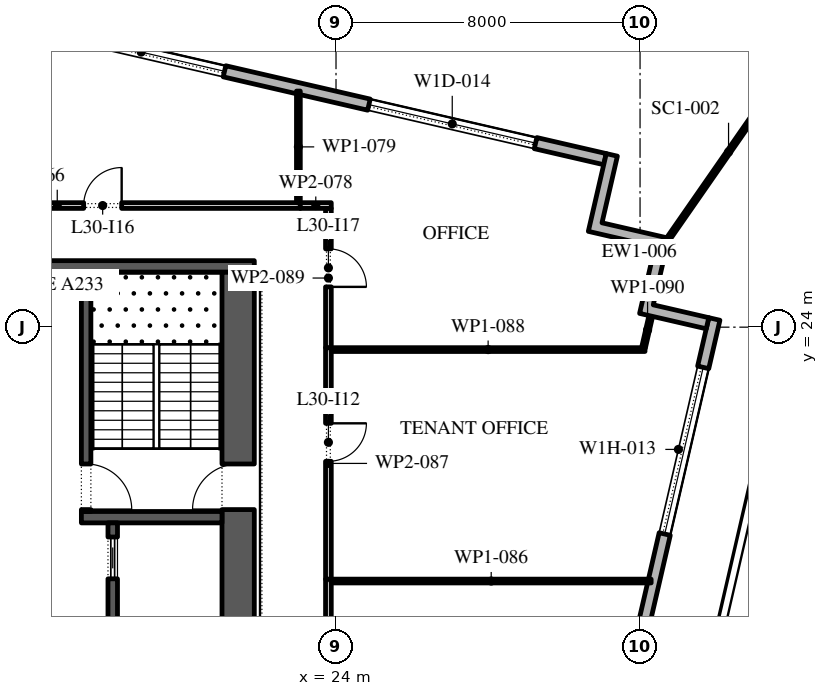
"""IFC4 building model, lengths in metres.
Left out: names, types, materials, properties, quantities, classifications, styles, units other than length and angle.
Written with IfcOpenShell. Run it as: python <this file> out.ifc"""

import sys

from ifc_helpers import new_model, si_unit, direction, frame, frame_2d, origin, place, context, subcontext, project, spatial, polyline, rectangle, outline, extrude, element, fill, save


model = new_model("IFC4")
c1 = context("Model", 3, precision=1e-05, world=origin(), true_north=direction((0.0, 1.0)))
c2 = subcontext(c1, "Body", "Model", "MODEL_VIEW")
j1 = project(units=[si_unit("LENGTHUNIT", "METRE"), si_unit("PLANEANGLEUNIT", "RADIAN")], contexts=[c1])
p1 = place(None, origin())
s1 = spatial("IfcSite", under=j1, at=p1, CompositionType="ELEMENT")
p2 = place(p1, origin())
s2 = spatial("IfcBuilding", under=s1, at=p2, CompositionType="ELEMENT")
p3 = place(p2, frame((0.0, 0.0, 139.2)))
s3 = spatial("IfcBuildingStorey", under=s2, at=p3, CompositionType="ELEMENT", Elevation=139.2)
p4 = place(p3, frame((22.82, -24.016, 0.0), z_axis=(0.0, 0.0, 1.0), x_axis=(0.224953880882, 0.974369412223, 0.0)))
e1 = element("IfcWall", 1, at=p4, inside=s3, PredefinedType="STANDARD", context=c2, shape_type="SweptSolid", body=[
    extrude(rectangle(XDim=49.5, YDim=0.3, at=frame_2d((24.75, 0.0))), origin(), (0.0, 0.0, 1.0), 4.0),
])
p5 = place(p4, frame((1.157, 0.0, 0.45)))
e2 = element("IfcOpeningElement", 2, at=p5, cuts=e1, PredefinedType="OPENING", context=c2, shape_type="SweptSolid", body=[
    extrude(rectangle(XDim=4.5, YDim=3.05, at=frame_2d((2.25, 1.525))), frame((0.0, 0.16, 0.0), z_axis=(0.0, -1.0, 0.0), x_axis=(1.0, 0.0, 0.0)), (0.0, 0.0, 1.0), 0.32),
])
p6 = place(p4, frame((8.121, 0.0, 0.45)))
e3 = element("IfcOpeningElement", 3, at=p6, cuts=e1, PredefinedType="OPENING", context=c2, shape_type="SweptSolid", body=[
    extrude(rectangle(XDim=4.5, YDim=3.05, at=frame_2d((2.25, 1.525))), frame((0.0, 0.16, 0.0), z_axis=(0.0, -1.0, 0.0), x_axis=(1.0, 0.0, 0.0)), (0.0, 0.0, 1.0), 0.32),
])
p7 = place(p4, frame((15.236, 0.0, 0.45)))
e4 = element("IfcOpeningElement", 4, at=p7, cuts=e1, PredefinedType="OPENING", context=c2, shape_type="SweptSolid", body=[
    extrude(rectangle(XDim=4.5, YDim=3.05, at=frame_2d((2.25, 1.525))), frame((0.0, 0.16, 0.0), z_axis=(0.0, -1.0, 0.0), x_axis=(1.0, 0.0, 0.0)), (0.0, 0.0, 1.0), 0.32),
])
p8 = place(p4, frame((23.4, 0.0, 0.0)))
e5 = element("IfcOpeningElement", 5, at=p8, cuts=e1, PredefinedType="OPENING", context=c2, shape_type="SweptSolid", body=[
    extrude(rectangle(XDim=2.4, YDim=3.5, at=frame_2d((1.2, 1.75))), frame((0.0, 0.16, 0.0), z_axis=(0.0, -1.0, 0.0), x_axis=(1.0, 0.0, 0.0)), (0.0, 0.0, 1.0), 0.32),
])
p9 = place(p4, frame((29.464, 0.0, 0.45)))
e6 = element("IfcOpeningElement", 6, at=p9, cuts=e1, PredefinedType="OPENING", context=c2, shape_type="SweptSolid", body=[
    extrude(rectangle(XDim=4.5, YDim=2.875, at=frame_2d((2.25, 1.438))), frame((0.0, 0.16, 0.0), z_axis=(0.0, -1.0, 0.0), x_axis=(1.0, 0.0, 0.0)), (0.0, 0.0, 1.0), 0.32),
])
p10 = place(p4, frame((36.579, 0.0, 0.45)))
e7 = element("IfcOpeningElement", 7, at=p10, cuts=e1, PredefinedType="OPENING", context=c2, shape_type="SweptSolid", body=[
    extrude(rectangle(XDim=4.5, YDim=2.825, at=frame_2d((2.25, 1.413))), frame((0.0, 0.16, 0.0), z_axis=(0.0, -1.0, 0.0), x_axis=(1.0, 0.0, 0.0)), (0.0, 0.0, 1.0), 0.32),
])
p11 = place(p4, frame((43.693, 0.0, 0.45)))
e8 = element("IfcOpeningElement", 8, at=p11, cuts=e1, PredefinedType="OPENING", context=c2, shape_type="SweptSolid", body=[
    extrude(rectangle(XDim=4.5, YDim=2.75, at=frame_2d((2.25, 1.375))), frame((0.0, 0.16, 0.0), z_axis=(0.0, -1.0, 0.0), x_axis=(1.0, 0.0, 0.0)), (0.0, 0.0, 1.0), 0.32),
])
p12 = place(p3, frame((31.078, 28.421, 0.0), z_axis=(0.0, 0.0, 1.0), x_axis=(-0.974370456532, 0.224949357493, 0.0)))
e9 = element("IfcWall", 9, at=p12, inside=s3, PredefinedType="STANDARD", context=c2, shape_type="SweptSolid", body=[
    extrude(rectangle(XDim=51.0, YDim=0.3, at=frame_2d((25.5, 0.0))), origin(), (0.0, 0.0, 1.0), 4.0),
])
p13 = place(p12, frame((1.875, 0.0, 0.45)))
e10 = element("IfcOpeningElement", 10, at=p13, cuts=e9, PredefinedType="OPENING", context=c2, shape_type="SweptSolid", body=[
    extrude(rectangle(XDim=4.5, YDim=2.875, at=frame_2d((2.25, 1.438))), frame((0.0, 0.16, 0.0), z_axis=(0.0, -1.0, 0.0), x_axis=(1.0, 0.0, 0.0)), (0.0, 0.0, 1.0), 0.32),
])
p14 = place(p12, frame((10.275, 0.0, 0.45)))
e11 = element("IfcOpeningElement", 11, at=p14, cuts=e9, PredefinedType="OPENING", context=c2, shape_type="SweptSolid", body=[
    extrude(rectangle(XDim=4.5, YDim=2.825, at=frame_2d((2.25, 1.413))), frame((0.0, 0.16, 0.0), z_axis=(0.0, -1.0, 0.0), x_axis=(1.0, 0.0, 0.0)), (0.0, 0.0, 1.0), 0.32),
])
p15 = place(p12, frame((18.825, 0.0, 0.45)))
e12 = element("IfcOpeningElement", 12, at=p15, cuts=e9, PredefinedType="OPENING", context=c2, shape_type="SweptSolid", body=[
    extrude(rectangle(XDim=4.5, YDim=2.75, at=frame_2d((2.25, 1.375))), frame((0.0, 0.16, 0.0), z_axis=(0.0, -1.0, 0.0), x_axis=(1.0, 0.0, 0.0)), (0.0, 0.0, 1.0), 0.32),
])
p16 = place(p12, frame((27.075, 0.0, 0.0)))
e13 = element("IfcOpeningElement", 13, at=p16, cuts=e9, PredefinedType="OPENING", context=c2, shape_type="SweptSolid", body=[
    extrude(rectangle(XDim=2.4, YDim=3.125, at=frame_2d((1.2, 1.562))), frame((0.0, 0.16, 0.0), z_axis=(0.0, -1.0, 0.0), x_axis=(1.0, 0.0, 0.0)), (0.0, 0.0, 1.0), 0.32),
])
p17 = place(p12, frame((35.925, 0.0, 0.45)))
e14 = element("IfcOpeningElement", 14, at=p17, cuts=e9, PredefinedType="OPENING", context=c2, shape_type="SweptSolid", body=[
    extrude(rectangle(XDim=4.5, YDim=2.525, at=frame_2d((2.25, 1.262))), frame((0.0, 0.16, 0.0), z_axis=(0.0, -1.0, 0.0), x_axis=(1.0, 0.0, 0.0)), (0.0, 0.0, 1.0), 0.32),
])
p18 = place(p12, frame((44.475, 0.0, 0.45)))
e15 = element("IfcOpeningElement", 15, at=p18, cuts=e9, PredefinedType="OPENING", context=c2, shape_type="SweptSolid", body=[
    extrude(rectangle(XDim=4.5, YDim=2.45, at=frame_2d((2.25, 1.225))), frame((0.0, 0.16, 0.0), z_axis=(0.0, -1.0, 0.0), x_axis=(1.0, 0.0, 0.0)), (0.0, 0.0, 1.0), 0.32),
])
p19 = place(p3, origin())
e16 = element("IfcWall", 16, at=p19, inside=s3, PredefinedType="STANDARD", context=c2, shape_type="SweptSolid", body=[
    extrude(outline(polyline([(32.393, 26.116), (30.639, 26.521), (31.111, 28.567), (31.404, 28.5), (30.999, 26.746), (32.753, 26.341), (32.348, 24.587), (33.809, 24.25), (33.742, 23.957), (31.988, 24.362), (32.393, 26.116)])), origin(), (0.0, 0.0, 1.0), 4.0),
])
p20 = place(p3, frame((32.753, 26.341, -0.05), z_axis=(0.0, 0.0, 1.0), x_axis=(0.570723811276, 0.821142089557, 0.0)))
e17 = element("IfcWall", 17, at=p20, inside=s3, PredefinedType="STANDARD", context=c2, shape_type="SweptSolid", body=[
    extrude(rectangle(XDim=5.523, YDim=0.1, at=frame_2d((2.761, 0.0))), origin(), (0.0, 0.0, 1.0), 4.05),
])
p21 = place(p3, frame((21.425, -2.45, 0.0), z_axis=(0.0, 0.0, 1.0), x_axis=(0.0, 1.0, 0.0)))
e18 = element("IfcWall", 18, at=p21, inside=s3, PredefinedType="SHEAR", context=c2, shape_type="SweptSolid", body=[
    extrude(rectangle(XDim=27.9, YDim=0.85, at=frame_2d((13.95, 0.0))), origin(), (0.0, 0.0, 1.0), 4.0),
])
p22 = place(p21, frame((5.05, 0.0, 0.0)))
e19 = element("IfcOpeningElement", 19, at=p22, cuts=e18, PredefinedType="OPENING", context=c2, shape_type="SweptSolid", body=[
    extrude(rectangle(XDim=1.2, YDim=2.1, at=frame_2d((0.6, 1.05))), frame((0.0, 0.435, 0.0), z_axis=(0.0, -1.0, 0.0), x_axis=(1.0, 0.0, 0.0)), (0.0, 0.0, 1.0), 0.87),
])
p23 = place(p21, frame((21.65, 0.0, 0.0)))
e20 = element("IfcOpeningElement", 20, at=p23, cuts=e18, PredefinedType="OPENING", context=c2, shape_type="SweptSolid", body=[
    extrude(rectangle(XDim=1.2, YDim=2.1, at=frame_2d((0.6, 1.05))), frame((0.0, 0.435, 0.0), z_axis=(0.0, -1.0, 0.0), x_axis=(1.0, 0.0, 0.0)), (0.0, 0.0, 1.0), 0.87),
])
p24 = place(p3, frame((10.15, 25.6, 0.0), z_axis=(0.0, 0.0, 1.0), x_axis=(1.0, 0.0, 0.0)))
e21 = element("IfcWall", 21, at=p24, inside=s3, PredefinedType="SHEAR", context=c2, shape_type="SweptSolid", body=[
    extrude(rectangle(XDim=11.7, YDim=0.3, at=frame_2d((5.85, 0.0))), origin(), (0.0, 0.0, 1.0), 4.0),
])
p25 = place(p3, frame((17.3, 19.0, 0.0), z_axis=(0.0, 0.0, 1.0), x_axis=(1.0, 0.0, 0.0)))
e22 = element("IfcWall", 22, at=p25, inside=s3, PredefinedType="SHEAR", context=c2, shape_type="SweptSolid", body=[
    extrude(rectangle(XDim=3.7, YDim=0.3, at=frame_2d((1.85, 0.0))), origin(), (0.0, 0.0, 1.0), 4.0),
])
p26 = place(p3, frame((17.425, 19.15, 0.0), z_axis=(0.0, 0.0, 1.0), x_axis=(0.0, 1.0, 0.0)))
e23 = element("IfcWall", 23, at=p26, inside=s3, PredefinedType="SHEAR", context=c2, shape_type="SweptSolid", body=[
    extrude(rectangle(XDim=6.3, YDim=0.25, at=frame_2d((3.15, 0.0))), origin(), (0.0, 0.0, 1.0), 4.0),
])
p27 = place(p26, frame((0.05, 0.0, 0.0)))
e24 = element("IfcOpeningElement", 24, at=p27, cuts=e23, PredefinedType="OPENING", context=c2, shape_type="SweptSolid", body=[
    extrude(rectangle(XDim=1.2, YDim=2.1, at=frame_2d((0.6, 1.05))), frame((0.0, 0.135, 0.0), z_axis=(0.0, -1.0, 0.0), x_axis=(1.0, 0.0, 0.0)), (0.0, 0.0, 1.0), 0.27),
])
p28 = place(p3, frame((18.125, 4.15, 0.0), z_axis=(0.0, 0.0, 1.0), x_axis=(0.0, 1.0, 0.0)))
e25 = element("IfcWall", 25, at=p28, inside=s3, PredefinedType="SHEAR", context=c2, shape_type="SweptSolid", body=[
    extrude(rectangle(XDim=14.7, YDim=0.25, at=frame_2d((7.35, 0.0))), origin(), (0.0, 0.0, 1.0), 4.0),
])
p29 = place(p28, frame((0.371, 0.0, 0.0)))
e26 = element("IfcOpeningElement", 26, at=p29, cuts=e25, PredefinedType="OPENING", context=c2, shape_type="SweptSolid", body=[
    extrude(rectangle(XDim=1.1, YDim=2.1, at=frame_2d((0.55, 1.05))), frame((0.0, 0.135, 0.0), z_axis=(0.0, -1.0, 0.0), x_axis=(1.0, 0.0, 0.0)), (0.0, 0.0, 1.0), 0.27),
])
p30 = place(p28, frame((2.514, 0.0, 0.0)))
e27 = element("IfcOpeningElement", 27, at=p30, cuts=e25, PredefinedType="OPENING", context=c2, shape_type="SweptSolid", body=[
    extrude(rectangle(XDim=1.1, YDim=2.1, at=frame_2d((0.55, 1.05))), frame((0.0, 0.135, 0.0), z_axis=(0.0, -1.0, 0.0), x_axis=(1.0, 0.0, 0.0)), (0.0, 0.0, 1.0), 0.27),
])
p31 = place(p28, frame((4.657, 0.0, 0.0)))
e28 = element("IfcOpeningElement", 28, at=p31, cuts=e25, PredefinedType="OPENING", context=c2, shape_type="SweptSolid", body=[
    extrude(rectangle(XDim=1.1, YDim=2.1, at=frame_2d((0.55, 1.05))), frame((0.0, 0.135, 0.0), z_axis=(0.0, -1.0, 0.0), x_axis=(1.0, 0.0, 0.0)), (0.0, 0.0, 1.0), 0.27),
])
p32 = place(p28, frame((6.8, 0.0, 0.0)))
e29 = element("IfcOpeningElement", 29, at=p32, cuts=e25, PredefinedType="OPENING", context=c2, shape_type="SweptSolid", body=[
    extrude(rectangle(XDim=1.1, YDim=2.1, at=frame_2d((0.55, 1.05))), frame((0.0, 0.135, 0.0), z_axis=(0.0, -1.0, 0.0), x_axis=(1.0, 0.0, 0.0)), (0.0, 0.0, 1.0), 0.27),
])
p33 = place(p28, frame((8.943, 0.0, 0.0)))
e30 = element("IfcOpeningElement", 30, at=p33, cuts=e25, PredefinedType="OPENING", context=c2, shape_type="SweptSolid", body=[
    extrude(rectangle(XDim=1.1, YDim=2.1, at=frame_2d((0.55, 1.05))), frame((0.0, 0.135, 0.0), z_axis=(0.0, -1.0, 0.0), x_axis=(1.0, 0.0, 0.0)), (0.0, 0.0, 1.0), 0.27),
])
p34 = place(p28, frame((11.086, 0.0, 0.0)))
e31 = element("IfcOpeningElement", 31, at=p34, cuts=e25, PredefinedType="OPENING", context=c2, shape_type="SweptSolid", body=[
    extrude(rectangle(XDim=1.1, YDim=2.1, at=frame_2d((0.55, 1.05))), frame((0.0, 0.135, 0.0), z_axis=(0.0, -1.0, 0.0), x_axis=(1.0, 0.0, 0.0)), (0.0, 0.0, 1.0), 0.27),
])
p35 = place(p28, frame((13.229, 0.0, 0.0)))
e32 = element("IfcOpeningElement", 32, at=p35, cuts=e25, PredefinedType="OPENING", context=c2, shape_type="SweptSolid", body=[
    extrude(rectangle(XDim=1.1, YDim=2.1, at=frame_2d((0.55, 1.05))), frame((0.0, 0.135, 0.0), z_axis=(0.0, -1.0, 0.0), x_axis=(1.0, 0.0, 0.0)), (0.0, 0.0, 1.0), 0.27),
])
p36 = place(p3, frame((10.27, 27.2, 0.0), z_axis=(0.0, 0.0, 1.0), x_axis=(1.0, 0.0, 0.0)))
e33 = element("IfcWall", 33, at=p36, inside=s3, PredefinedType="PARTITIONING", context=c2, shape_type="SweptSolid", body=[
    extrude(rectangle(XDim=12.79, YDim=0.15, at=frame_2d((6.395, 0.0))), origin(), (0.0, 0.0, 1.0), 4.0),
])
p37 = place(p36, frame((7.09, 0.0, 0.0)))
e34 = element("IfcOpeningElement", 34, at=p37, cuts=e33, PredefinedType="OPENING", context=c2, shape_type="SweptSolid", body=[
    extrude(rectangle(XDim=1.0, YDim=2.1, at=frame_2d((0.5, 1.05))), frame((0.0, 0.085, 0.0), z_axis=(0.0, -1.0, 0.0), x_axis=(1.0, 0.0, 0.0)), (0.0, 0.0, 1.0), 0.17),
])
p38 = place(p3, frame((23.06, 27.2, 0.0), z_axis=(0.0, 0.0, 1.0), x_axis=(1.0, 0.0, 0.0)))
e35 = element("IfcWall", 35, at=p38, inside=s3, PredefinedType="PARTITIONING", context=c2, shape_type="SweptSolid", body=[
    extrude(rectangle(XDim=0.815, YDim=0.15, at=frame_2d((0.407, 0.0))), origin(), (0.0, 0.0, 1.0), 4.0),
])
p39 = place(p3, frame((23.01, 30.212, 0.0), z_axis=(0.0, 0.0, 1.0), x_axis=(0.0, -1.0, 0.0)))
e36 = element("IfcWall", 36, at=p39, inside=s3, PredefinedType="PARTITIONING", context=c2, shape_type="SweptSolid", body=[
    extrude(rectangle(XDim=2.937, YDim=0.1, at=frame_2d((1.469, 0.0))), origin(), (0.0, 0.0, 1.0), 4.0),
])
p40 = place(p3, frame((23.8, 17.37, 0.0), z_axis=(0.0, 0.0, 1.0), x_axis=(0.0, -1.0, 0.0)))
e37 = element("IfcWall", 37, at=p40, inside=s3, PredefinedType="PARTITIONING", context=c2, shape_type="SweptSolid", body=[
    extrude(rectangle(XDim=6.98, YDim=0.15, at=frame_2d((3.49, 0.0))), origin(), (0.0, 0.0, 1.0), 4.0),
])
p41 = place(p40, frame((3.83, 0.0, 0.0)))
e38 = element("IfcOpeningElement", 38, at=p41, cuts=e37, PredefinedType="OPENING", context=c2, shape_type="SweptSolid", body=[
    extrude(rectangle(XDim=1.0, YDim=2.1, at=frame_2d((0.5, 1.05))), frame((0.0, 0.085, 0.0), z_axis=(0.0, -1.0, 0.0), x_axis=(1.0, 0.0, 0.0)), (0.0, 0.0, 1.0), 0.17),
])
p42 = place(p3, frame((23.875, 17.32, 0.0), z_axis=(0.0, 0.0, 1.0), x_axis=(1.0, 0.0, 0.0)))
e39 = element("IfcWall", 39, at=p42, inside=s3, PredefinedType="PARTITIONING", context=c2, shape_type="SweptSolid", body=[
    extrude(rectangle(XDim=8.417, YDim=0.1, at=frame_2d((4.208, 0.0))), origin(), (0.0, 0.0, 1.0), 4.0),
])
p43 = place(p3, frame((23.8, 23.46, 0.0), z_axis=(0.0, 0.0, 1.0), x_axis=(0.0, -1.0, 0.0)))
e40 = element("IfcWall", 40, at=p43, inside=s3, PredefinedType="PARTITIONING", context=c2, shape_type="SweptSolid", body=[
    extrude(rectangle(XDim=6.09, YDim=0.15, at=frame_2d((3.045, 0.0))), origin(), (0.0, 0.0, 1.0), 4.0),
])
p44 = place(p43, frame((1.99, 0.0, 0.0)))
e41 = element("IfcOpeningElement", 41, at=p44, cuts=e40, PredefinedType="OPENING", context=c2, shape_type="SweptSolid", body=[
    extrude(rectangle(XDim=1.0, YDim=2.1, at=frame_2d((0.5, 1.05))), frame((0.0, 0.085, 0.0), z_axis=(0.0, -1.0, 0.0), x_axis=(1.0, 0.0, 0.0)), (0.0, 0.0, 1.0), 0.17),
])
p45 = place(p3, frame((23.875, 23.41, 0.0), z_axis=(0.0, 0.0, 1.0), x_axis=(1.0, 0.0, 0.0)))
e42 = element("IfcWall", 42, at=p45, inside=s3, PredefinedType="PARTITIONING", context=c2, shape_type="SweptSolid", body=[
    extrude(rectangle(XDim=8.255, YDim=0.1, at=frame_2d((4.127, 0.0))), origin(), (0.0, 0.0, 1.0), 4.0),
])
p46 = place(p3, frame((23.8, 27.125, 0.0), z_axis=(0.0, 0.0, 1.0), x_axis=(0.0, -1.0, 0.0)))
e43 = element("IfcWall", 43, at=p46, inside=s3, PredefinedType="PARTITIONING", context=c2, shape_type="SweptSolid", body=[
    extrude(rectangle(XDim=3.665, YDim=0.15, at=frame_2d((1.833, 0.0))), origin(), (0.0, 0.0, 1.0), 4.0),
])
p47 = place(p46, frame((1.065, 0.0, 0.0)))
e44 = element("IfcOpeningElement", 44, at=p47, cuts=e43, PredefinedType="OPENING", context=c2, shape_type="SweptSolid", body=[
    extrude(rectangle(XDim=1.0, YDim=2.1, at=frame_2d((0.5, 1.05))), frame((0.0, 0.085, 0.0), z_axis=(0.0, -1.0, 0.0), x_axis=(1.0, 0.0, 0.0)), (0.0, 0.0, 1.0), 0.17),
])
p48 = place(p3, frame((32.091, 23.459, 0.0), z_axis=(0.0, 0.0, 1.0), x_axis=(0.223406444343, 0.97472537703, 0.0)))
e45 = element("IfcWall", 45, at=p48, inside=s3, PredefinedType="PARTITIONING", context=c2, shape_type="SweptSolid", body=[
    extrude(rectangle(XDim=0.957, YDim=0.1, at=frame_2d((0.479, 0.0))), origin(), (0.0, 0.0, 1.0), 4.0),
])
p49 = place(p11, origin())
e46 = element("IfcWindow", 46, at=p49, inside=s3, PartitioningType="DOUBLE_PANEL_VERTICAL", PredefinedType="WINDOW", context=c2, shape_type="SweptSolid", body=[
    extrude(rectangle(XDim=4.5, YDim=2.75, at=frame_2d((2.25, 1.375))), frame((0.0, 0.03, 0.0), z_axis=(0.0, -1.0, 0.0), x_axis=(1.0, 0.0, 0.0)), (0.0, 0.0, 1.0), 0.06),
])
fill(e8, e46)
p50 = place(p13, origin())
e47 = element("IfcWindow", 47, at=p50, inside=s3, PartitioningType="DOUBLE_PANEL_VERTICAL", PredefinedType="WINDOW", context=c2, shape_type="SweptSolid", body=[
    extrude(rectangle(XDim=4.5, YDim=2.875, at=frame_2d((2.25, 1.438))), frame((0.0, 0.03, 0.0), z_axis=(0.0, -1.0, 0.0), x_axis=(1.0, 0.0, 0.0)), (0.0, 0.0, 1.0), 0.06),
])
fill(e10, e47)
p51 = place(p14, origin())
e48 = element("IfcWindow", 48, at=p51, inside=s3, PartitioningType="DOUBLE_PANEL_VERTICAL", PredefinedType="WINDOW", context=c2, shape_type="SweptSolid", body=[
    extrude(rectangle(XDim=4.5, YDim=2.825, at=frame_2d((2.25, 1.413))), frame((0.0, 0.03, 0.0), z_axis=(0.0, -1.0, 0.0), x_axis=(1.0, 0.0, 0.0)), (0.0, 0.0, 1.0), 0.06),
])
fill(e11, e48)
p52 = place(p35, origin())
e49 = element("IfcDoor", 49, at=p52, inside=s3, OperationType="SLIDING_TO_LEFT", PredefinedType="DOOR", context=c2, shape_type="SweptSolid", body=[
    extrude(rectangle(XDim=1.1, YDim=2.1, at=frame_2d((0.55, 1.05))), frame((0.0, 0.025, 0.0), z_axis=(0.0, -1.0, 0.0), x_axis=(1.0, 0.0, 0.0)), (0.0, 0.0, 1.0), 0.05),
])
fill(e32, e49)
p53 = place(p27, frame((1.2, 0.0, 0.0), z_axis=(0.0, 0.0, 1.0), x_axis=(-1.0, 0.0, 0.0)))
e50 = element("IfcDoor", 50, at=p53, inside=s3, OperationType="SINGLE_SWING_LEFT", PredefinedType="DOOR", context=c2, shape_type="SweptSolid", body=[
    extrude(rectangle(XDim=1.2, YDim=2.1, at=frame_2d((0.6, 1.05))), frame((0.0, 0.025, 0.0), z_axis=(0.0, -1.0, 0.0), x_axis=(1.0, 0.0, 0.0)), (0.0, 0.0, 1.0), 0.05),
])
fill(e24, e50)
p54 = place(p23, origin())
e51 = element("IfcDoor", 51, at=p54, inside=s3, OperationType="SINGLE_SWING_RIGHT", PredefinedType="DOOR", context=c2, shape_type="SweptSolid", body=[
    extrude(rectangle(XDim=1.2, YDim=2.1, at=frame_2d((0.6, 1.05))), frame((0.0, 0.025, 0.0), z_axis=(0.0, -1.0, 0.0), x_axis=(1.0, 0.0, 0.0)), (0.0, 0.0, 1.0), 0.05),
])
fill(e20, e51)
p55 = place(p44, origin())
e52 = element("IfcDoor", 52, at=p55, inside=s3, OperationType="SINGLE_SWING_RIGHT", PredefinedType="DOOR", context=c2, shape_type="SweptSolid", body=[
    extrude(rectangle(XDim=1.0, YDim=2.1, at=frame_2d((0.5, 1.05))), frame((0.0, 0.025, 0.0), z_axis=(0.0, -1.0, 0.0), x_axis=(1.0, 0.0, 0.0)), (0.0, 0.0, 1.0), 0.05),
])
fill(e41, e52)
p56 = place(p37, origin())
e53 = element("IfcDoor", 53, at=p56, inside=s3, OperationType="SINGLE_SWING_LEFT", PredefinedType="DOOR", context=c2, shape_type="SweptSolid", body=[
    extrude(rectangle(XDim=1.0, YDim=2.1, at=frame_2d((0.5, 1.05))), frame((0.0, 0.025, 0.0), z_axis=(0.0, -1.0, 0.0), x_axis=(1.0, 0.0, 0.0)), (0.0, 0.0, 1.0), 0.05),
])
fill(e34, e53)
p57 = place(p47, origin())
e54 = element("IfcDoor", 54, at=p57, inside=s3, OperationType="SINGLE_SWING_LEFT", PredefinedType="DOOR", context=c2, shape_type="SweptSolid", body=[
    extrude(rectangle(XDim=1.0, YDim=2.1, at=frame_2d((0.5, 1.05))), frame((0.0, 0.025, 0.0), z_axis=(0.0, -1.0, 0.0), x_axis=(1.0, 0.0, 0.0)), (0.0, 0.0, 1.0), 0.05),
])
fill(e44, e54)
save(model, sys.argv[1])
